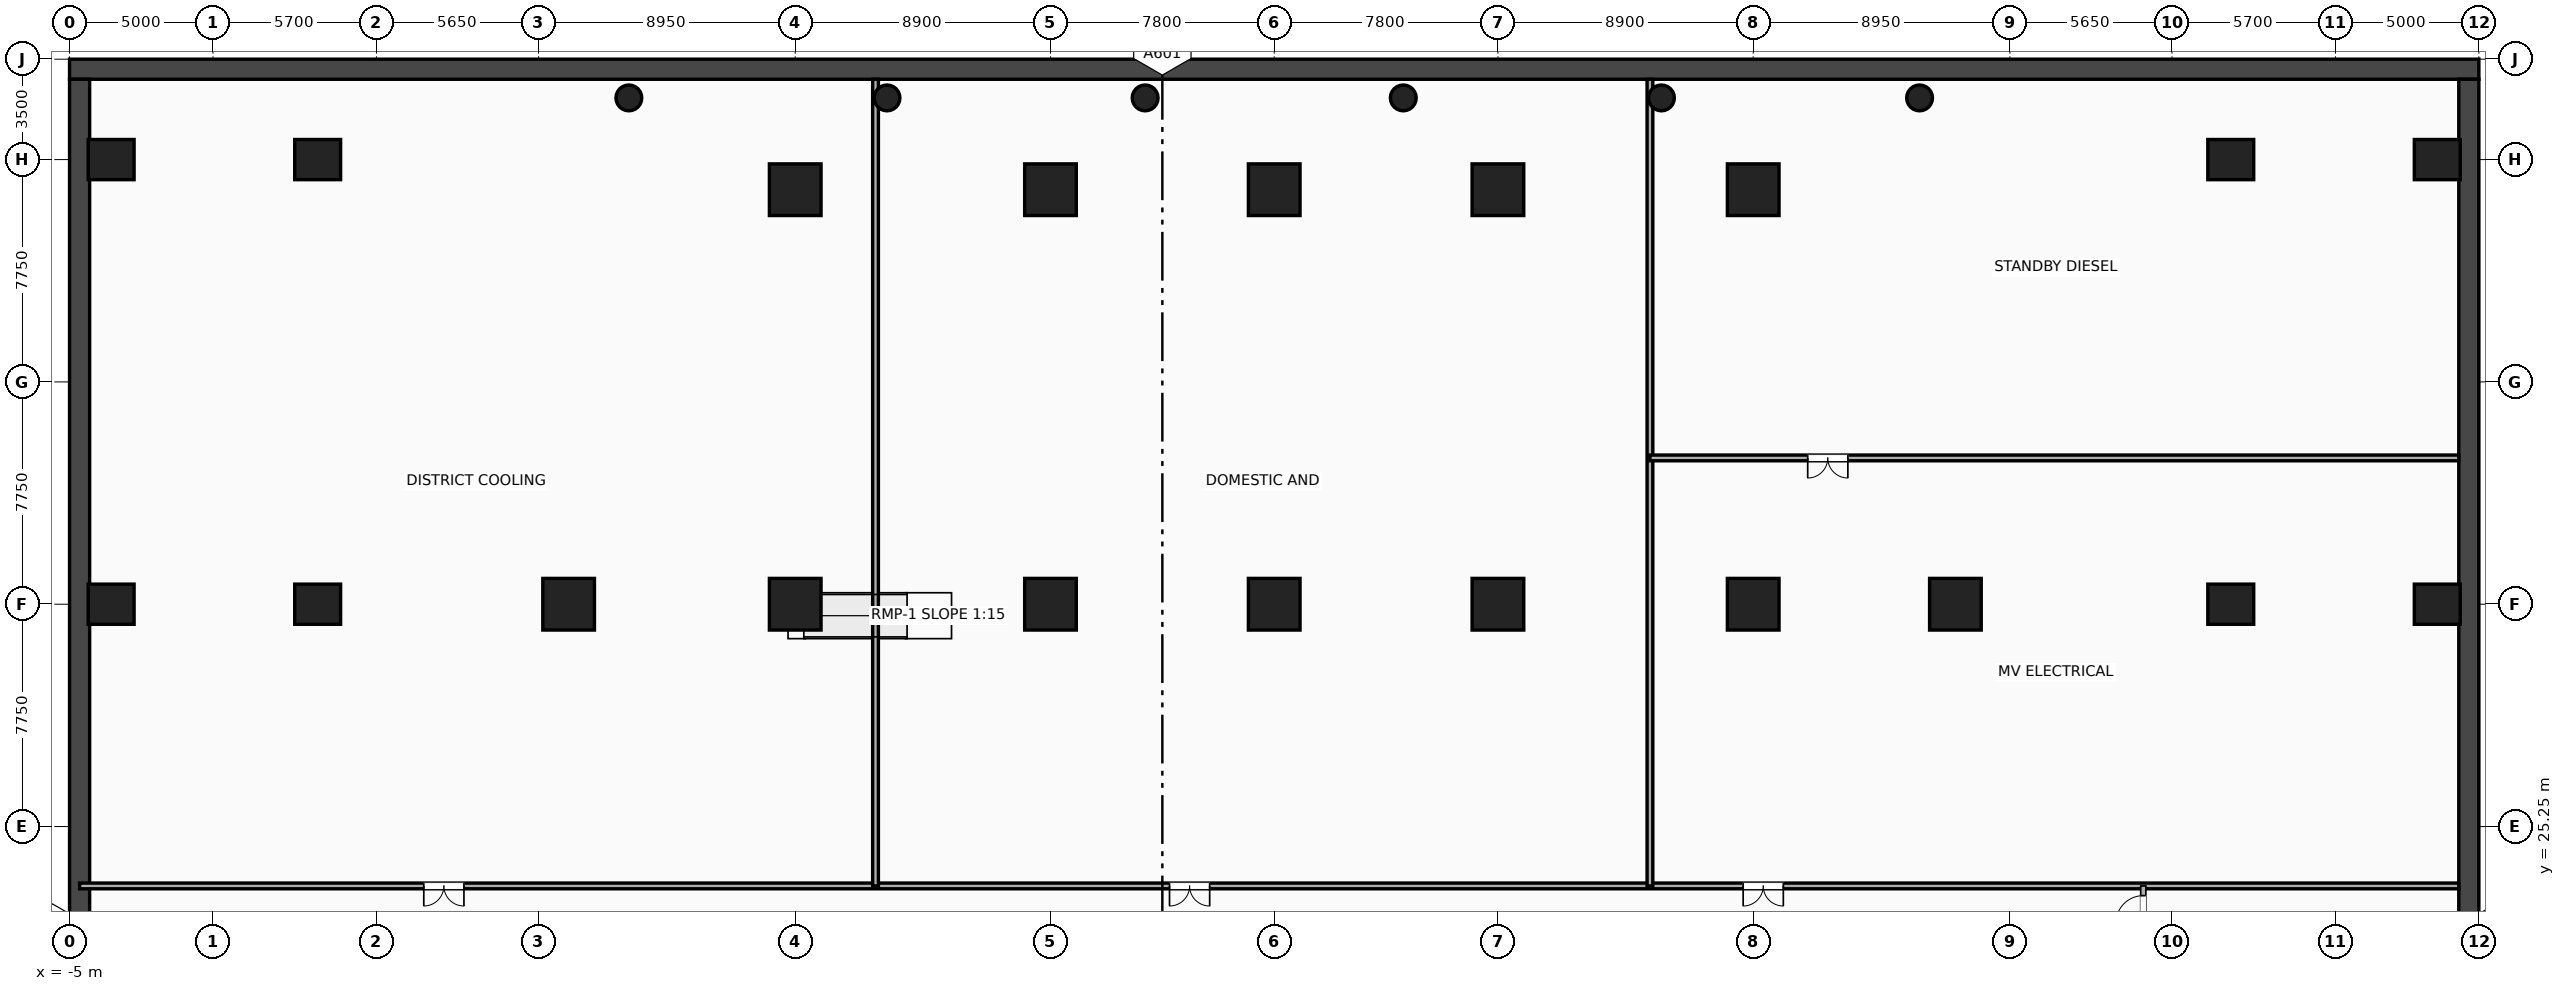
"""IFC4 building model, lengths in metres.
Left out: names, types, materials, properties, quantities, classifications, styles, units other than length and angle.
Written with IfcOpenShell. Run it as: python <this file> out.ifc"""

import sys

from ifc_helpers import new_model, si_unit, direction, frame, frame_2d, origin, origin_2d, place, context, subcontext, project, spatial, rectangle, circle, extrude, element, fill, save


model = new_model("IFC4")
c1 = context("Model", 3, precision=1e-05, world=origin(), true_north=direction((0.0, 1.0)))
c2 = subcontext(c1, "Body", "Model", "MODEL_VIEW")
j1 = project(units=[si_unit("LENGTHUNIT", "METRE"), si_unit("PLANEANGLEUNIT", "RADIAN")], contexts=[c1])
p1 = place(None, origin())
s1 = spatial("IfcSite", under=j1, at=p1, CompositionType="ELEMENT")
p2 = place(p1, origin())
s2 = spatial("IfcBuilding", under=s1, at=p2, CompositionType="ELEMENT")
p3 = place(p2, frame((0.0, 0.0, -5.4)))
s3 = spatial("IfcBuildingStorey", under=s2, at=p3, CompositionType="ELEMENT", Elevation=-5.4)
p4 = place(p3, frame((-5.0, 51.65, 0.0), z_axis=(0.0, 0.0, 1.0), x_axis=(1.0, 0.0, 0.0)))
e1 = element("IfcWall", 1, at=p4, inside=s3, PredefinedType="SOLIDWALL", context=c2, shape_type="SweptSolid", body=[
    extrude(rectangle(XDim=84.0, YDim=0.7, at=frame_2d((42.0, 0.0))), origin(), (0.0, 0.0, 1.0), 5.05),
])
for number, where, z_axis, x_axis in (
    (2, (-4.65, 0.7, 0.0), (0.0, 0.0, 1.0), (0.0, 1.0, 0.0)),
    (3, (78.65, 0.7, 0.0), (0.0, 0.0, 1.0), (0.0, 1.0, 0.0)),
):
    element("IfcWall", number, at=place(p3, frame(where, z_axis=z_axis, x_axis=x_axis)), inside=s3, PredefinedType="SOLIDWALL", context=c2, shape_type="SweptSolid", body=[
        extrude(rectangle(XDim=50.6, YDim=0.7, at=frame_2d((25.3, 0.0))), origin(), (0.0, 0.0, 1.0), 5.05),
    ])
for number, where, z_axis, x_axis in (
    (4, (20.3, 33.0, 0.0), (0.0, 0.0, 1.0), (1.0, 0.0, 0.0)),
    (5, (29.2, 33.0, 0.0), (0.0, 0.0, 1.0), (1.0, 0.0, 0.0)),
    (6, (37.0, 33.0, 0.0), (0.0, 0.0, 1.0), (1.0, 0.0, 0.0)),
    (7, (44.8, 33.0, 0.0), (0.0, 0.0, 1.0), (1.0, 0.0, 0.0)),
    (8, (12.4, 33.0, 0.0), (0.0, 0.0, 1.0), (1.0, 0.0, 0.0)),
    (9, (20.3, 47.45, 0.0), (0.0, 0.0, 1.0), (1.0, 0.0, 0.0)),
    (10, (29.2, 47.45, 0.0), (0.0, 0.0, 1.0), (1.0, 0.0, 0.0)),
    (11, (37.0, 47.45, 0.0), (0.0, 0.0, 1.0), (1.0, 0.0, 0.0)),
    (12, (44.8, 47.45, 0.0), (0.0, 0.0, 1.0), (1.0, 0.0, 0.0)),
    (13, (53.7, 47.45, 0.0), (0.0, 0.0, 1.0), (1.0, 0.0, 0.0)),
    (14, (60.75, 33.0, 0.0), (0.0, 0.0, 1.0), (1.0, 0.0, 0.0)),
    (15, (53.7, 33.0, 0.0), (0.0, 0.0, 1.0), (1.0, 0.0, 0.0)),
):
    element("IfcColumn", number, at=place(p3, frame(where, z_axis=z_axis, x_axis=x_axis)), inside=s3, PredefinedType="COLUMN", context=c2, shape_type="SweptSolid", body=[
        extrude(rectangle(XDim=1.8, YDim=1.8, at=origin_2d()), origin(), (0.0, 0.0, 1.0), 5.05),
    ])
for number, where, z_axis, x_axis in (
    (16, (-3.55, 33.0, 0.0), (0.0, 0.0, 1.0), (1.0, 0.0, 0.0)),
    (17, (3.65, 33.0, 0.0), (0.0, 0.0, 1.0), (1.0, 0.0, 0.0)),
    (18, (-3.55, 48.5, 0.0), (0.0, 0.0, 1.0), (1.0, 0.0, 0.0)),
    (19, (3.65, 48.5, 0.0), (0.0, 0.0, 1.0), (1.0, 0.0, 0.0)),
    (20, (70.35, 33.0, 0.0), (0.0, 0.0, 1.0), (1.0, 0.0, 0.0)),
    (21, (77.55, 33.0, 0.0), (0.0, 0.0, 1.0), (1.0, 0.0, 0.0)),
    (22, (70.35, 48.5, 0.0), (0.0, 0.0, 1.0), (1.0, 0.0, 0.0)),
    (23, (77.55, 48.5, 0.0), (0.0, 0.0, 1.0), (1.0, 0.0, 0.0)),
):
    element("IfcColumn", number, at=place(p3, frame(where, z_axis=z_axis, x_axis=x_axis)), inside=s3, PredefinedType="COLUMN", context=c2, shape_type="SweptSolid", body=[
        extrude(rectangle(XDim=1.6, YDim=1.4, at=origin_2d()), origin(), (0.0, 0.0, 1.0), 5.05),
    ])
for number, where, z_axis, x_axis in (
    (24, (14.5, 50.65, 0.0), (0.0, 0.0, 1.0), (1.0, 0.0, 0.0)),
    (25, (23.5, 50.65, 0.0), (0.0, 0.0, 1.0), (1.0, 0.0, 0.0)),
    (26, (32.5, 50.65, 0.0), (0.0, 0.0, 1.0), (1.0, 0.0, 0.0)),
    (27, (41.5, 50.65, 0.0), (0.0, 0.0, 1.0), (1.0, 0.0, 0.0)),
    (28, (50.5, 50.65, 0.0), (0.0, 0.0, 1.0), (1.0, 0.0, 0.0)),
    (29, (59.5, 50.65, 0.0), (0.0, 0.0, 1.0), (1.0, 0.0, 0.0)),
):
    element("IfcColumn", number, at=place(p3, frame(where, z_axis=z_axis, x_axis=x_axis)), inside=s3, PredefinedType="COLUMN", context=c2, shape_type="SweptSolid", body=[
        extrude(circle(Radius=0.45, at=origin_2d()), origin(), (0.0, 0.0, 1.0), 5.05),
    ])
p5 = place(p3, frame((-4.65, 23.18, 0.0), z_axis=(0.0, 0.0, 1.0), x_axis=(1.0, 0.0, 0.0)))
e30 = element("IfcWall", 30, at=p5, inside=s3, PredefinedType="PARTITIONING", context=c2, shape_type="SweptSolid", body=[
    extrude(rectangle(XDim=82.95, YDim=0.2, at=frame_2d((41.475, 0.0))), origin(), (0.0, 0.0, 1.0), 4.18),
])
p6 = place(p5, frame((12.0, 0.0, 0.0)))
e31 = element("IfcOpeningElement", 31, at=p6, cuts=e30, PredefinedType="OPENING", context=c2, shape_type="SweptSolid", body=[
    extrude(rectangle(XDim=1.4, YDim=2.2, at=frame_2d((0.7, 1.1))), frame((0.0, 0.11, 0.0), z_axis=(0.0, -1.0, 0.0), x_axis=(1.0, 0.0, 0.0)), (0.0, 0.0, 1.0), 0.22),
])
p7 = place(p5, frame((38.0, 0.0, 0.0)))
e32 = element("IfcOpeningElement", 32, at=p7, cuts=e30, PredefinedType="OPENING", context=c2, shape_type="SweptSolid", body=[
    extrude(rectangle(XDim=1.4, YDim=2.2, at=frame_2d((0.7, 1.1))), frame((0.0, 0.11, 0.0), z_axis=(0.0, -1.0, 0.0), x_axis=(1.0, 0.0, 0.0)), (0.0, 0.0, 1.0), 0.22),
])
p8 = place(p5, frame((58.0, 0.0, 0.0)))
e33 = element("IfcOpeningElement", 33, at=p8, cuts=e30, PredefinedType="OPENING", context=c2, shape_type="SweptSolid", body=[
    extrude(rectangle(XDim=1.4, YDim=2.2, at=frame_2d((0.7, 1.1))), frame((0.0, 0.11, 0.0), z_axis=(0.0, -1.0, 0.0), x_axis=(1.0, 0.0, 0.0)), (0.0, 0.0, 1.0), 0.22),
])
p9 = place(p3, frame((67.3, 16.1, 0.0), z_axis=(0.0, 0.0, 1.0), x_axis=(0.0, 1.0, 0.0)))
e34 = element("IfcWall", 34, at=p9, inside=s3, PredefinedType="PARTITIONING", context=c2, shape_type="SweptSolid", body=[
    extrude(rectangle(XDim=7.08, YDim=0.18, at=frame_2d((3.54, 0.0))), origin(), (0.0, 0.0, 1.0), 5.05),
])
p10 = place(p9, frame((6.741, 0.0, 0.0), z_axis=(0.0, 0.0, 1.0), x_axis=(-1.0, 0.0, 0.0)))
e35 = element("IfcOpeningElement", 35, at=p10, cuts=e34, PredefinedType="OPENING", context=c2, shape_type="SweptSolid", body=[
    extrude(rectangle(XDim=0.95, YDim=2.15, at=frame_2d((0.475, 1.075))), frame((0.0, 0.1, 0.0), z_axis=(0.0, -1.0, 0.0), x_axis=(1.0, 0.0, 0.0)), (0.0, 0.0, 1.0), 0.2),
])
for number, where, z_axis, x_axis in (
    (36, (23.1, 23.18, 0.0), (0.0, 0.0, 1.0), (0.0, 1.0, 0.0)),
    (37, (50.1, 23.18, 0.0), (0.0, 0.0, 1.0), (0.0, 1.0, 0.0)),
):
    element("IfcWall", number, at=place(p3, frame(where, z_axis=z_axis, x_axis=x_axis)), inside=s3, PredefinedType="PARTITIONING", context=c2, shape_type="SweptSolid", body=[
        extrude(rectangle(XDim=28.12, YDim=0.2, at=frame_2d((14.06, 0.0))), origin(), (0.0, 0.0, 1.0), 4.114),
    ])
p11 = place(p3, frame((50.1, 38.1, 0.0), z_axis=(0.0, 0.0, 1.0), x_axis=(1.0, 0.0, 0.0)))
e38 = element("IfcWall", 38, at=p11, inside=s3, PredefinedType="PARTITIONING", context=c2, shape_type="SweptSolid", body=[
    extrude(rectangle(XDim=28.2, YDim=0.2, at=frame_2d((14.1, 0.0))), origin(), (0.0, 0.0, 1.0), 4.18),
])
p12 = place(p11, frame((5.5, 0.0, 0.0)))
e39 = element("IfcOpeningElement", 39, at=p12, cuts=e38, PredefinedType="OPENING", context=c2, shape_type="SweptSolid", body=[
    extrude(rectangle(XDim=1.4, YDim=2.2, at=frame_2d((0.7, 1.1))), frame((0.0, 0.11, 0.0), z_axis=(0.0, -1.0, 0.0), x_axis=(1.0, 0.0, 0.0)), (0.0, 0.0, 1.0), 0.22),
])
p13 = place(p6, origin())
e40 = element("IfcDoor", 40, at=p13, inside=s3, OperationType="DOUBLE_DOOR_SINGLE_SWING", PredefinedType="DOOR", context=c2, shape_type="SweptSolid", body=[
    extrude(rectangle(XDim=1.4, YDim=2.2, at=frame_2d((0.7, 1.1))), frame((0.0, 0.025, 0.0), z_axis=(0.0, -1.0, 0.0), x_axis=(1.0, 0.0, 0.0)), (0.0, 0.0, 1.0), 0.05),
])
fill(e31, e40)
p14 = place(p7, origin())
e41 = element("IfcDoor", 41, at=p14, inside=s3, OperationType="DOUBLE_DOOR_SINGLE_SWING", PredefinedType="DOOR", context=c2, shape_type="SweptSolid", body=[
    extrude(rectangle(XDim=1.4, YDim=2.2, at=frame_2d((0.7, 1.1))), frame((0.0, 0.025, 0.0), z_axis=(0.0, -1.0, 0.0), x_axis=(1.0, 0.0, 0.0)), (0.0, 0.0, 1.0), 0.05),
])
fill(e32, e41)
p15 = place(p8, origin())
e42 = element("IfcDoor", 42, at=p15, inside=s3, OperationType="DOUBLE_DOOR_SINGLE_SWING", PredefinedType="DOOR", context=c2, shape_type="SweptSolid", body=[
    extrude(rectangle(XDim=1.4, YDim=2.2, at=frame_2d((0.7, 1.1))), frame((0.0, 0.025, 0.0), z_axis=(0.0, -1.0, 0.0), x_axis=(1.0, 0.0, 0.0)), (0.0, 0.0, 1.0), 0.05),
])
fill(e33, e42)
p16 = place(p10, origin())
e43 = element("IfcDoor", 43, at=p16, inside=s3, OperationType="SINGLE_SWING_LEFT", PredefinedType="DOOR", context=c2, shape_type="SweptSolid", body=[
    extrude(rectangle(XDim=0.95, YDim=2.15, at=frame_2d((0.475, 1.075))), frame((0.0, 0.025, 0.0), z_axis=(0.0, -1.0, 0.0), x_axis=(1.0, 0.0, 0.0)), (0.0, 0.0, 1.0), 0.05),
])
fill(e35, e43)
p17 = place(p12, origin())
e44 = element("IfcDoor", 44, at=p17, inside=s3, OperationType="DOUBLE_DOOR_SINGLE_SWING", PredefinedType="DOOR", context=c2, shape_type="SweptSolid", body=[
    extrude(rectangle(XDim=1.4, YDim=2.2, at=frame_2d((0.7, 1.1))), frame((0.0, 0.025, 0.0), z_axis=(0.0, -1.0, 0.0), x_axis=(1.0, 0.0, 0.0)), (0.0, 0.0, 1.0), 0.05),
])
fill(e39, e44)
save(model, sys.argv[1])
